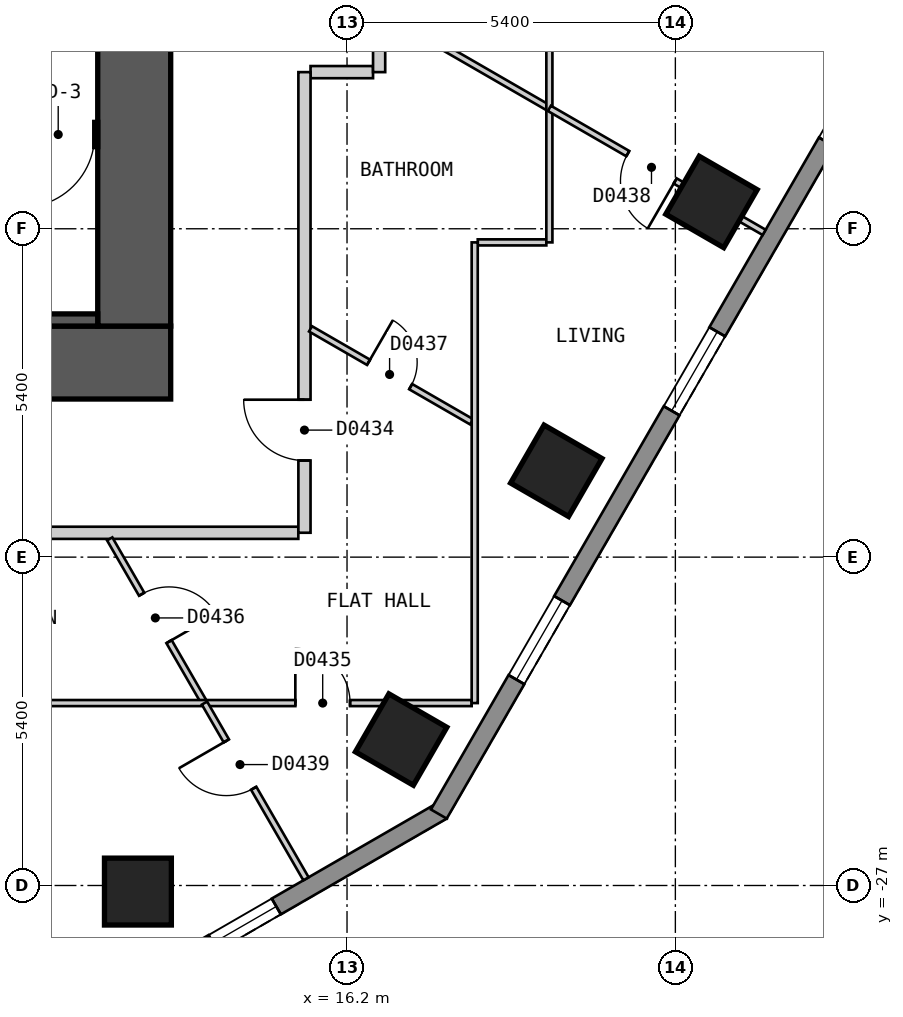
"""IFC4 building model, lengths in metres.
Left out: names, types, materials, properties, quantities, classifications, styles, units other than length and angle.
Written with IfcOpenShell. Run it as: python <this file> out.ifc"""

import sys

from ifc_helpers import new_model, si_unit, direction, frame, frame_2d, origin, origin_2d, place, context, subcontext, project, spatial, polyline, rectangle, outline, extrude, element, fill, save


model = new_model("IFC4")
c1 = context("Model", 3, precision=1e-05, world=origin(), true_north=direction((0.0, 1.0)))
c2 = subcontext(c1, "Body", "Model", "MODEL_VIEW")
j1 = project(units=[si_unit("LENGTHUNIT", "METRE"), si_unit("PLANEANGLEUNIT", "RADIAN")], contexts=[c1])
p1 = place(None, origin())
s1 = spatial("IfcSite", under=j1, at=p1, CompositionType="ELEMENT")
p2 = place(p1, origin())
s2 = spatial("IfcBuilding", under=s1, at=p2, CompositionType="ELEMENT")
p3 = place(p2, frame((0.0, 0.0, 38.4)))
s3 = spatial("IfcBuildingStorey", under=s2, at=p3, CompositionType="ELEMENT", Elevation=38.4)
for number, where, z_axis, x_axis in (
    (1, (12.761, -27.1, 0.0), (0.0, 0.0, 1.0), (1.0, 0.0, 0.0)),
    (2, (17.09, -24.6, 0.0), (0.0, 0.0, 1.0), (0.5, 0.866, 0.0)),
    (3, (19.642, -20.18, 0.0), (0.0, 0.0, 1.0), (0.5, 0.866, 0.0)),
    (4, (22.194, -15.759, 0.0), (0.0, 0.0, 1.0), (0.5, 0.866, 0.0)),
):
    element("IfcColumn", number, at=place(p3, frame(where, z_axis=z_axis, x_axis=x_axis)), inside=s3, PredefinedType="COLUMN", context=c2, shape_type="SweptSolid", body=[
        extrude(rectangle(XDim=1.1, YDim=1.1, at=origin_2d()), origin(), (0.0, 0.0, 1.0), 3.0),
    ])
p4 = place(p3, frame((-13.3, -18.4, 0.0), z_axis=(0.0, 0.0, 1.0), x_axis=(1.0, 0.0, 0.0)))
e5 = element("IfcWall", 5, at=p4, inside=s3, PredefinedType="SHEAR", context=c2, shape_type="SweptSolid", body=[
    extrude(rectangle(XDim=26.6, YDim=1.2, at=frame_2d((13.3, 0.0))), origin(), (0.0, 0.0, 1.0), 2.7),
])
p5 = place(p3, frame((12.7, -17.8, 0.0), z_axis=(0.0, 0.0, 1.0), x_axis=(0.0, 1.0, 0.0)))
e6 = element("IfcWall", 6, at=p5, inside=s3, PredefinedType="SHEAR", context=c2, shape_type="SweptSolid", body=[
    extrude(rectangle(XDim=11.6, YDim=1.2, at=frame_2d((5.8, 0.0))), origin(), (0.0, 0.0, 1.0), 2.7),
])
p6 = place(p3, frame((-12.1, -14.65, 0.0), z_axis=(0.0, 0.0, 1.0), x_axis=(1.0, 0.0, 0.0)))
e7 = element("IfcWall", 7, at=p6, inside=s3, PredefinedType="SHEAR", context=c2, shape_type="SweptSolid", body=[
    extrude(rectangle(XDim=24.2, YDim=0.4, at=frame_2d((12.1, 0.0))), origin(), (0.0, 0.0, 1.0), 2.7),
])
p7 = place(p6, frame((1.3, 0.0, 0.0), z_axis=(0.0, 0.0, 1.0), x_axis=(-1.0, 0.0, 0.0)))
e8 = element("IfcOpeningElement", 8, at=p7, cuts=e7, PredefinedType="OPENING", context=c2, shape_type="SweptSolid", body=[
    extrude(rectangle(XDim=1.2, YDim=2.1, at=frame_2d((0.6, 1.05))), frame((0.0, 0.21, 0.0), z_axis=(0.0, -1.0, 0.0), x_axis=(1.0, 0.0, 0.0)), (0.0, 0.0, 1.0), 0.42),
])
p8 = place(p6, frame((24.15, 0.0, 0.0), z_axis=(0.0, 0.0, 1.0), x_axis=(-1.0, 0.0, 0.0)))
e9 = element("IfcOpeningElement", 9, at=p8, cuts=e7, PredefinedType="OPENING", context=c2, shape_type="SweptSolid", body=[
    extrude(rectangle(XDim=1.2, YDim=2.1, at=frame_2d((0.6, 1.05))), frame((0.0, 0.21, 0.0), z_axis=(0.0, -1.0, 0.0), x_axis=(1.0, 0.0, 0.0)), (0.0, 0.0, 1.0), 0.42),
])
p9 = place(p6, frame((17.2, 0.0, 0.0), z_axis=(0.0, 0.0, 1.0), x_axis=(-1.0, 0.0, 0.0)))
e10 = element("IfcOpeningElement", 10, at=p9, cuts=e7, PredefinedType="OPENING", context=c2, shape_type="SweptSolid", body=[
    extrude(rectangle(XDim=1.0, YDim=2.1, at=frame_2d((0.5, 1.05))), frame((0.0, 0.21, 0.0), z_axis=(0.0, -1.0, 0.0), x_axis=(1.0, 0.0, 0.0)), (0.0, 0.0, 1.0), 0.42),
])
p10 = place(p3, frame((13.435, -28.27, 0.0), z_axis=(0.0, 0.0, 1.0), x_axis=(0.866010750942, 0.50002537861, 0.0)))
e11 = element("IfcWall", 11, at=p10, inside=s3, PredefinedType="SOLIDWALL", context=c2, shape_type="SweptSolid", body=[
    extrude(outline(polyline([(0.0, -0.15), (5.0, -0.15), (4.919, 0.15), (0.08, 0.15), (0.0, -0.15)])), origin(), (0.0, 0.0, 1.0), 2.7),
])
p11 = place(p10, frame((0.65, 0.0, 0.15)))
e12 = element("IfcOpeningElement", 12, at=p11, cuts=e11, PredefinedType="OPENING", context=c2, shape_type="SweptSolid", body=[
    extrude(rectangle(XDim=1.2, YDim=2.1, at=frame_2d((0.6, 1.05))), frame((0.0, 0.16, 0.0), z_axis=(0.0, -1.0, 0.0), x_axis=(1.0, 0.0, 0.0)), (0.0, 0.0, 1.0), 0.32),
])
p12 = place(p3, frame((17.71, -25.825, 0.0), z_axis=(0.0, 0.0, 1.0), x_axis=(0.500001938803, 0.866024284413, 0.0)))
e13 = element("IfcWall", 13, at=p12, inside=s3, PredefinedType="SOLIDWALL", context=c2, shape_type="SweptSolid", body=[
    extrude(outline(polyline([(0.0, -0.15), (27.02, -0.15), (26.94, 0.15), (0.08, 0.15), (0.0, -0.15)])), origin(), (0.0, 0.0, 1.0), 2.7),
])
p13 = place(p12, frame((2.553, 0.0, 0.15)))
e14 = element("IfcOpeningElement", 14, at=p13, cuts=e13, PredefinedType="OPENING", context=c2, shape_type="SweptSolid", body=[
    extrude(rectangle(XDim=1.5, YDim=2.1, at=frame_2d((0.75, 1.05))), frame((0.0, 0.16, 0.0), z_axis=(0.0, -1.0, 0.0), x_axis=(1.0, 0.0, 0.0)), (0.0, 0.0, 1.0), 0.32),
])
p14 = place(p12, frame((7.658, 0.0, 0.15)))
e15 = element("IfcOpeningElement", 15, at=p14, cuts=e13, PredefinedType="OPENING", context=c2, shape_type="SweptSolid", body=[
    extrude(rectangle(XDim=1.5, YDim=2.1, at=frame_2d((0.75, 1.05))), frame((0.0, 0.16, 0.0), z_axis=(0.0, -1.0, 0.0), x_axis=(1.0, 0.0, 0.0)), (0.0, 0.0, 1.0), 0.32),
])
p15 = place(p12, frame((12.761, 0.0, 0.15)))
e16 = element("IfcOpeningElement", 16, at=p15, cuts=e13, PredefinedType="OPENING", context=c2, shape_type="SweptSolid", body=[
    extrude(rectangle(XDim=1.5, YDim=2.1, at=frame_2d((0.75, 1.05))), frame((0.0, 0.16, 0.0), z_axis=(0.0, -1.0, 0.0), x_axis=(1.0, 0.0, 0.0)), (0.0, 0.0, 1.0), 0.32),
])
p16 = place(p12, frame((17.865, 0.0, 0.15)))
e17 = element("IfcOpeningElement", 17, at=p16, cuts=e13, PredefinedType="OPENING", context=c2, shape_type="SweptSolid", body=[
    extrude(rectangle(XDim=1.5, YDim=2.1, at=frame_2d((0.75, 1.05))), frame((0.0, 0.16, 0.0), z_axis=(0.0, -1.0, 0.0), x_axis=(1.0, 0.0, 0.0)), (0.0, 0.0, 1.0), 0.32),
])
p17 = place(p12, frame((22.969, 0.0, 0.15)))
e18 = element("IfcOpeningElement", 18, at=p17, cuts=e13, PredefinedType="OPENING", context=c2, shape_type="SweptSolid", body=[
    extrude(rectangle(XDim=1.5, YDim=2.1, at=frame_2d((0.75, 1.05))), frame((0.0, 0.16, 0.0), z_axis=(0.0, -1.0, 0.0), x_axis=(1.0, 0.0, 0.0)), (0.0, 0.0, 1.0), 0.32),
])
p18 = place(p3, frame((15.6, -13.624, 0.0), z_axis=(0.0, 0.0, 1.0), x_axis=(1.0, 0.0, 0.0)))
e19 = element("IfcWall", 19, at=p18, inside=s3, PredefinedType="PARTITIONING", context=c2, shape_type="SweptSolid", body=[
    extrude(rectangle(XDim=1.028, YDim=0.2, at=frame_2d((0.514, 0.0))), origin(), (0.0, 0.0, 1.0), 2.7),
])
p19 = place(p3, frame((-15.499, -21.2, 0.0), z_axis=(0.0, 0.0, 1.0), x_axis=(1.0, 0.0, 0.0)))
e20 = element("IfcWall", 20, at=p19, inside=s3, PredefinedType="PARTITIONING", context=c2, shape_type="SweptSolid", body=[
    extrude(rectangle(XDim=30.898, YDim=0.2, at=frame_2d((15.449, 0.0))), origin(), (0.0, 0.0, 1.0), 2.7),
])
p20 = place(p19, frame((15.0, 0.0, 0.0)))
e21 = element("IfcOpeningElement", 21, at=p20, cuts=e20, PredefinedType="OPENING", context=c2, shape_type="SweptSolid", body=[
    extrude(rectangle(XDim=1.0, YDim=2.1, at=frame_2d((0.5, 1.05))), frame((0.0, 0.11, 0.0), z_axis=(0.0, -1.0, 0.0), x_axis=(1.0, 0.0, 0.0)), (0.0, 0.0, 1.0), 0.22),
])
p21 = place(p19, frame((20.104, 0.0, 0.0)))
e22 = element("IfcOpeningElement", 22, at=p21, cuts=e20, PredefinedType="OPENING", context=c2, shape_type="SweptSolid", body=[
    extrude(rectangle(XDim=1.0, YDim=2.1, at=frame_2d((0.5, 1.05))), frame((0.0, 0.11, 0.0), z_axis=(0.0, -1.0, 0.0), x_axis=(1.0, 0.0, 0.0)), (0.0, 0.0, 1.0), 0.22),
])
p22 = place(p3, frame((15.5, -21.199, 0.0), z_axis=(0.0, 0.0, 1.0), x_axis=(0.0, 1.0, 0.0)))
e23 = element("IfcWall", 23, at=p22, inside=s3, PredefinedType="PARTITIONING", context=c2, shape_type="SweptSolid", body=[
    extrude(rectangle(XDim=7.575, YDim=0.2, at=frame_2d((3.788, 0.0))), origin(), (0.0, 0.0, 1.0), 2.7),
])
p23 = place(p22, frame((1.188, 0.0, 0.0)))
e24 = element("IfcOpeningElement", 24, at=p23, cuts=e23, PredefinedType="OPENING", context=c2, shape_type="SweptSolid", body=[
    extrude(rectangle(XDim=1.0, YDim=2.1, at=frame_2d((0.5, 1.05))), frame((0.0, 0.11, 0.0), z_axis=(0.0, -1.0, 0.0), x_axis=(1.0, 0.0, 0.0)), (0.0, 0.0, 1.0), 0.22),
])
p24 = place(p3, frame((16.728, -13.624, 0.0), z_axis=(0.0, 0.0, 1.0), x_axis=(0.0, 1.0, 0.0)))
e25 = element("IfcWall", 25, at=p24, inside=s3, PredefinedType="PARTITIONING", context=c2, shape_type="SweptSolid", body=[
    extrude(rectangle(XDim=4.83, YDim=0.2, at=frame_2d((2.415, 0.0))), origin(), (0.0, 0.0, 1.0), 2.7),
])
p25 = place(p3, frame((12.297, -21.3, 0.0), z_axis=(0.0, 0.0, 1.0), x_axis=(0.500004896655, -0.866022576681, 0.0)))
e26 = element("IfcWall", 26, at=p25, inside=s3, PredefinedType="PARTITIONING", context=c2, shape_type="SweptSolid", body=[
    extrude(rectangle(XDim=3.118, YDim=0.1, at=frame_2d((1.559, 0.0))), origin(), (0.0, 0.0, 1.0), 2.7),
])
p26 = place(p25, frame((1.051, 0.0, 0.0)))
e27 = element("IfcOpeningElement", 27, at=p26, cuts=e26, PredefinedType="OPENING", context=c2, shape_type="SweptSolid", body=[
    extrude(rectangle(XDim=0.9, YDim=2.1, at=frame_2d((0.45, 1.05))), frame((0.0, 0.06, 0.0), z_axis=(0.0, -1.0, 0.0), x_axis=(1.0, 0.0, 0.0)), (0.0, 0.0, 1.0), 0.12),
])
p27 = place(p3, frame((15.6, -17.846, 0.0), z_axis=(0.0, 0.0, 1.0), x_axis=(0.866148385016, -0.499786929736, 0.0)))
e28 = element("IfcWall", 28, at=p27, inside=s3, PredefinedType="PARTITIONING", context=c2, shape_type="SweptSolid", body=[
    extrude(rectangle(XDim=3.059, YDim=0.1, at=frame_2d((1.53, 0.0))), origin(), (0.0, 0.0, 1.0), 2.7),
])
p28 = place(p27, frame((1.101, 0.0, 0.0)))
e29 = element("IfcOpeningElement", 29, at=p28, cuts=e28, PredefinedType="OPENING", context=c2, shape_type="SweptSolid", body=[
    extrude(rectangle(XDim=0.8, YDim=2.1, at=frame_2d((0.4, 1.05))), frame((0.0, 0.06, 0.0), z_axis=(0.0, -1.0, 0.0), x_axis=(1.0, 0.0, 0.0)), (0.0, 0.0, 1.0), 0.12),
])
p29 = place(p3, frame((16.828, -12.661, 0.0), z_axis=(0.0, 0.0, 1.0), x_axis=(0.866008246423, -0.500029716244, 0.0)))
e30 = element("IfcWall", 30, at=p29, inside=s3, PredefinedType="PARTITIONING", context=c2, shape_type="SweptSolid", body=[
    extrude(rectangle(XDim=3.118, YDim=0.1, at=frame_2d((1.559, 0.0))), origin(), (0.0, 0.0, 1.0), 2.7),
])
p30 = place(p3, frame((18.35, -16.424, 0.0), z_axis=(0.0, 0.0, 1.0), x_axis=(1.0, 0.0, 0.0)))
e31 = element("IfcWall", 31, at=p30, inside=s3, PredefinedType="PARTITIONING", context=c2, shape_type="SweptSolid", body=[
    extrude(rectangle(XDim=1.128, YDim=0.1, at=frame_2d((0.564, 0.0))), origin(), (0.0, 0.0, 1.0), 2.7),
])
p31 = place(p3, frame((7.757, -24.0, 0.0), z_axis=(0.0, 0.0, 1.0), x_axis=(1.0, 0.0, 0.0)))
e32 = element("IfcWall", 32, at=p31, inside=s3, PredefinedType="PARTITIONING", context=c2, shape_type="SweptSolid", body=[
    extrude(rectangle(XDim=10.493, YDim=0.1, at=frame_2d((5.247, 0.0))), origin(), (0.0, 0.0, 1.0), 2.7),
])
p32 = place(p31, frame((7.593, 0.0, 0.0)))
e33 = element("IfcOpeningElement", 33, at=p32, cuts=e32, PredefinedType="OPENING", context=c2, shape_type="SweptSolid", body=[
    extrude(rectangle(XDim=0.9, YDim=2.1, at=frame_2d((0.45, 1.05))), frame((0.0, 0.06, 0.0), z_axis=(0.0, -1.0, 0.0), x_axis=(1.0, 0.0, 0.0)), (0.0, 0.0, 1.0), 0.12),
])
p33 = place(p3, frame((18.3, -24.0, 0.0), z_axis=(0.0, 0.0, 1.0), x_axis=(0.0, 1.0, 0.0)))
e34 = element("IfcWall", 34, at=p33, inside=s3, PredefinedType="PARTITIONING", context=c2, shape_type="SweptSolid", body=[
    extrude(rectangle(XDim=7.576, YDim=0.1, at=frame_2d((3.788, 0.0))), origin(), (0.0, 0.0, 1.0), 2.7),
])
p34 = place(p3, frame((19.528, -16.424, 0.0), z_axis=(0.0, 0.0, 1.0), x_axis=(0.0, 1.0, 0.0)))
e35 = element("IfcWall", 35, at=p34, inside=s3, PredefinedType="PARTITIONING", context=c2, shape_type="SweptSolid", body=[
    extrude(rectangle(XDim=7.982, YDim=0.1, at=frame_2d((3.991, 0.0))), origin(), (0.0, 0.0, 1.0), 2.7),
])
p35 = place(p34, frame((4.75, 0.0, 0.0)))
e36 = element("IfcOpeningElement", 36, at=p35, cuts=e35, PredefinedType="OPENING", context=c2, shape_type="SweptSolid", body=[
    extrude(rectangle(XDim=0.8, YDim=2.1, at=frame_2d((0.4, 1.05))), frame((0.0, 0.06, 0.0), z_axis=(0.0, -1.0, 0.0), x_axis=(1.0, 0.0, 0.0)), (0.0, 0.0, 1.0), 0.12),
])
p36 = place(p3, frame((13.856, -24.0, 0.0), z_axis=(0.0, 0.0, 1.0), x_axis=(0.50010451262, -0.865965054986, 0.0)))
e37 = element("IfcWall", 37, at=p36, inside=s3, PredefinedType="PARTITIONING", context=c2, shape_type="SweptSolid", body=[
    extrude(rectangle(XDim=3.337, YDim=0.1, at=frame_2d((1.668, 0.0))), origin(), (0.0, 0.0, 1.0), 2.7),
])
p37 = place(p36, frame((0.718, 0.0, 0.0)))
e38 = element("IfcOpeningElement", 38, at=p37, cuts=e37, PredefinedType="OPENING", context=c2, shape_type="SweptSolid", body=[
    extrude(rectangle(XDim=0.9, YDim=2.1, at=frame_2d((0.45, 1.05))), frame((0.0, 0.06, 0.0), z_axis=(0.0, -1.0, 0.0), x_axis=(1.0, 0.0, 0.0)), (0.0, 0.0, 1.0), 0.12),
])
p38 = place(p3, frame((19.528, -14.22, 0.0), z_axis=(0.0, 0.0, 1.0), x_axis=(0.866039047082, -0.499976368371, 0.0)))
e39 = element("IfcWall", 39, at=p38, inside=s3, PredefinedType="PARTITIONING", context=c2, shape_type="SweptSolid", body=[
    extrude(rectangle(XDim=4.078, YDim=0.1, at=frame_2d((2.039, 0.0))), origin(), (0.0, 0.0, 1.0), 2.7),
])
p39 = place(p38, frame((1.489, 0.0, 0.0)))
e40 = element("IfcOpeningElement", 40, at=p39, cuts=e39, PredefinedType="OPENING", context=c2, shape_type="SweptSolid", body=[
    extrude(rectangle(XDim=0.9, YDim=2.1, at=frame_2d((0.45, 1.05))), frame((0.0, 0.06, 0.0), z_axis=(0.0, -1.0, 0.0), x_axis=(1.0, 0.0, 0.0)), (0.0, 0.0, 1.0), 0.12),
])
p40 = place(p3, frame((6.7, -17.7, 0.0), z_axis=(0.0, 0.0, 1.0), x_axis=(1.0, 0.0, 0.0)))
e41 = element("IfcWall", 41, at=p40, inside=s3, PredefinedType="SOLIDWALL", context=c2, shape_type="SweptSolid", body=[
    extrude(rectangle(XDim=5.4, YDim=0.2, at=frame_2d((2.7, 0.0))), origin(), (0.0, 0.0, 1.0), 2.7),
])
p41 = place(p11, origin())
e42 = element("IfcWindow", 42, at=p41, inside=s3, PartitioningType="SINGLE_PANEL", PredefinedType="WINDOW", context=c2, shape_type="SweptSolid", body=[
    extrude(rectangle(XDim=1.2, YDim=2.1, at=frame_2d((0.6, 1.05))), frame((0.0, 0.03, 0.0), z_axis=(0.0, -1.0, 0.0), x_axis=(1.0, 0.0, 0.0)), (0.0, 0.0, 1.0), 0.06),
])
fill(e12, e42)
p42 = place(p13, origin())
e43 = element("IfcWindow", 43, at=p42, inside=s3, PartitioningType="SINGLE_PANEL", PredefinedType="WINDOW", context=c2, shape_type="SweptSolid", body=[
    extrude(rectangle(XDim=1.5, YDim=2.1, at=frame_2d((0.75, 1.05))), frame((0.0, 0.03, 0.0), z_axis=(0.0, -1.0, 0.0), x_axis=(1.0, 0.0, 0.0)), (0.0, 0.0, 1.0), 0.06),
])
fill(e14, e43)
p43 = place(p14, origin())
e44 = element("IfcWindow", 44, at=p43, inside=s3, PartitioningType="SINGLE_PANEL", PredefinedType="WINDOW", context=c2, shape_type="SweptSolid", body=[
    extrude(rectangle(XDim=1.5, YDim=2.1, at=frame_2d((0.75, 1.05))), frame((0.0, 0.03, 0.0), z_axis=(0.0, -1.0, 0.0), x_axis=(1.0, 0.0, 0.0)), (0.0, 0.0, 1.0), 0.06),
])
fill(e15, e44)
p44 = place(p23, origin())
e45 = element("IfcDoor", 45, at=p44, inside=s3, OperationType="SINGLE_SWING_RIGHT", PredefinedType="DOOR", context=c2, shape_type="SweptSolid", body=[
    extrude(rectangle(XDim=1.0, YDim=2.1, at=frame_2d((0.5, 1.05))), frame((0.0, 0.025, 0.0), z_axis=(0.0, -1.0, 0.0), x_axis=(1.0, 0.0, 0.0)), (0.0, 0.0, 1.0), 0.05),
])
fill(e24, e45)
p45 = place(p32, origin())
e46 = element("IfcDoor", 46, at=p45, inside=s3, OperationType="SINGLE_SWING_LEFT", PredefinedType="DOOR", context=c2, shape_type="SweptSolid", body=[
    extrude(rectangle(XDim=0.9, YDim=2.1, at=frame_2d((0.45, 1.05))), frame((0.0, 0.025, 0.0), z_axis=(0.0, -1.0, 0.0), x_axis=(1.0, 0.0, 0.0)), (0.0, 0.0, 1.0), 0.05),
])
fill(e33, e46)
p46 = place(p26, origin())
e47 = element("IfcDoor", 47, at=p46, inside=s3, OperationType="SINGLE_SWING_RIGHT", PredefinedType="DOOR", context=c2, shape_type="SweptSolid", body=[
    extrude(rectangle(XDim=0.9, YDim=2.1, at=frame_2d((0.45, 1.05))), frame((0.0, 0.025, 0.0), z_axis=(0.0, -1.0, 0.0), x_axis=(1.0, 0.0, 0.0)), (0.0, 0.0, 1.0), 0.05),
])
fill(e27, e47)
p47 = place(p28, origin())
e48 = element("IfcDoor", 48, at=p47, inside=s3, OperationType="SINGLE_SWING_LEFT", PredefinedType="DOOR", context=c2, shape_type="SweptSolid", body=[
    extrude(rectangle(XDim=0.8, YDim=2.1, at=frame_2d((0.4, 1.05))), frame((0.0, 0.025, 0.0), z_axis=(0.0, -1.0, 0.0), x_axis=(1.0, 0.0, 0.0)), (0.0, 0.0, 1.0), 0.05),
])
fill(e29, e48)
p48 = place(p39, origin())
e49 = element("IfcDoor", 49, at=p48, inside=s3, OperationType="SINGLE_SWING_RIGHT", PredefinedType="DOOR", context=c2, shape_type="SweptSolid", body=[
    extrude(rectangle(XDim=0.9, YDim=2.1, at=frame_2d((0.45, 1.05))), frame((0.0, 0.025, 0.0), z_axis=(0.0, -1.0, 0.0), x_axis=(1.0, 0.0, 0.0)), (0.0, 0.0, 1.0), 0.05),
])
fill(e40, e49)
p49 = place(p37, origin())
e50 = element("IfcDoor", 50, at=p49, inside=s3, OperationType="SINGLE_SWING_LEFT", PredefinedType="DOOR", context=c2, shape_type="SweptSolid", body=[
    extrude(rectangle(XDim=0.9, YDim=2.1, at=frame_2d((0.45, 1.05))), frame((0.0, 0.025, 0.0), z_axis=(0.0, -1.0, 0.0), x_axis=(1.0, 0.0, 0.0)), (0.0, 0.0, 1.0), 0.05),
])
fill(e38, e50)
p50 = place(p8, origin())
e51 = element("IfcDoor", 51, at=p50, inside=s3, OperationType="SINGLE_SWING_RIGHT", PredefinedType="DOOR", context=c2, shape_type="SweptSolid", body=[
    extrude(rectangle(XDim=1.2, YDim=2.1, at=frame_2d((0.6, 1.05))), frame((0.0, 0.025, 0.0), z_axis=(0.0, -1.0, 0.0), x_axis=(1.0, 0.0, 0.0)), (0.0, 0.0, 1.0), 0.05),
])
fill(e9, e51)
save(model, sys.argv[1])
